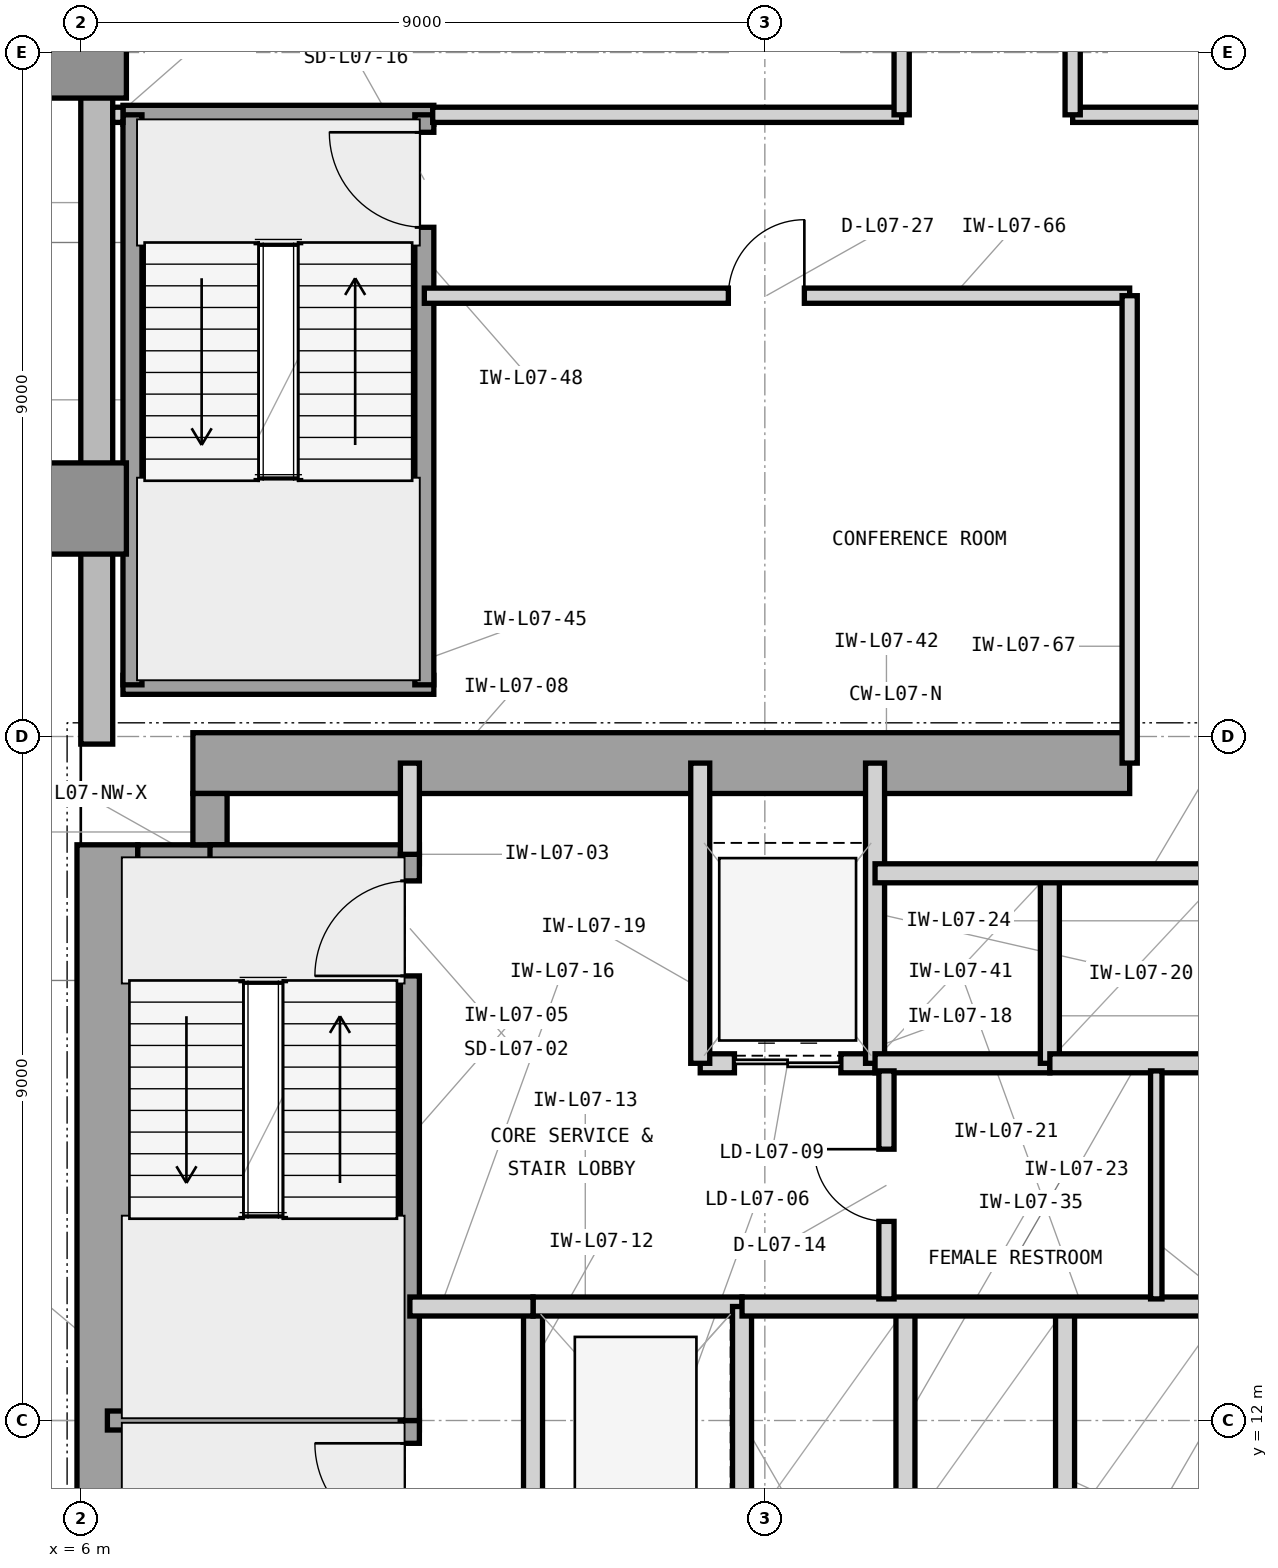
"""IFC4 building model, lengths in metres.
Left out: names, types, materials, properties, quantities, classifications, styles, units other than length and angle.
Written with IfcOpenShell. Run it as: python <this file> out.ifc"""

import sys

from ifc_helpers import new_model, si_unit, direction, frame, frame_2d, origin, origin_2d, place, context, subcontext, project, spatial, rectangle, extrude, element, fill, save


model = new_model("IFC4")
c1 = context("Model", 3, precision=1e-05, world=origin(), true_north=direction((0.0, 1.0)))
c2 = subcontext(c1, "Body", "Model", "MODEL_VIEW")
j1 = project(units=[si_unit("LENGTHUNIT", "METRE"), si_unit("PLANEANGLEUNIT", "RADIAN")], contexts=[c1])
p1 = place(None, origin())
s1 = spatial("IfcSite", under=j1, at=p1, CompositionType="ELEMENT")
p2 = place(p1, origin())
s2 = spatial("IfcBuilding", under=s1, at=p2, CompositionType="ELEMENT")
p3 = place(p2, frame((0.0, 0.0, 34.2)))
s3 = spatial("IfcBuildingStorey", under=s2, at=p3, CompositionType="ELEMENT", Elevation=34.2)
p4 = place(p3, frame((6.35, 4.425, 0.0), z_axis=(0.0, 0.0, 1.0), x_axis=(0.0, 1.0, 0.0)))
e1 = element("IfcWall", 1, at=p4, inside=s3, PredefinedType="SHEAR", context=c2, shape_type="SweptSolid", body=[
    extrude(rectangle(XDim=15.15, YDim=0.8, at=frame_2d((7.575, 0.0))), origin(), (0.0, 0.0, 1.0), 4.2),
])
p5 = place(p3, frame((7.475, 20.65, 0.0), z_axis=(0.0, 0.0, 1.0), x_axis=(1.0, 0.0, 0.0)))
e2 = element("IfcWall", 2, at=p5, inside=s3, PredefinedType="SHEAR", context=c2, shape_type="SweptSolid", body=[
    extrude(rectangle(XDim=12.325, YDim=0.8, at=frame_2d((6.163, 0.0))), origin(), (0.0, 0.0, 1.0), 4.2),
])
p6 = place(p3, frame((6.75, 19.35, 0.0), z_axis=(0.0, 0.0, 1.0), x_axis=(1.0, 0.0, 0.0)))
e3 = element("IfcWall", 3, at=p6, inside=s3, PredefinedType="SHEAR", context=c2, shape_type="SweptSolid", body=[
    extrude(rectangle(XDim=1.175, YDim=0.45, at=frame_2d((0.587, 0.0))), origin(), (0.0, 0.0, 1.0), 4.2),
])
p7 = place(p3, frame((7.7, 19.575, 0.0), z_axis=(0.0, 0.0, 1.0), x_axis=(0.0, 1.0, 0.0)))
e4 = element("IfcWall", 4, at=p7, inside=s3, PredefinedType="SHEAR", context=c2, shape_type="SweptSolid", body=[
    extrude(rectangle(XDim=0.675, YDim=0.45, at=frame_2d((0.337, 0.0))), origin(), (0.0, 0.0, 1.0), 4.2),
])
for number, where, z_axis, x_axis in (
    (5, (6.0, 24.0, 0.0), (0.0, 0.0, 1.0), (1.0, 0.0, 0.0)),
    (6, (6.0, 30.0, 0.0), (0.0, 0.0, 1.0), (1.0, 0.0, 0.0)),
):
    element("IfcColumn", number, at=place(p3, frame(where, z_axis=z_axis, x_axis=x_axis)), inside=s3, PredefinedType="COLUMN", context=c2, shape_type="SweptSolid", body=[
        extrude(rectangle(XDim=1.2, YDim=1.2, at=origin_2d()), origin(), (0.0, 0.0, 1.0), 4.2),
    ])
p8 = place(p3, frame((6.21, 49.4, 0.0), z_axis=(0.0, 0.0, 1.0), x_axis=(0.0, -1.0, 0.0)))
e7 = element("IfcWall", 7, at=p8, inside=s3, PredefinedType="STANDARD", context=c2, shape_type="SweptSolid", body=[
    extrude(rectangle(XDim=28.5, YDim=0.42, at=frame_2d((14.25, 0.0))), origin(), (0.0, 0.0, 1.0), 3.98),
])
p9 = place(p8, frame((15.225, 0.0, 0.85)))
e8 = element("IfcOpeningElement", 8, at=p9, cuts=e7, PredefinedType="OPENING", context=c2, shape_type="SweptSolid", body=[
    extrude(rectangle(XDim=2.8, YDim=2.45, at=frame_2d((1.4, 1.225))), frame((0.0, 0.22, 0.0), z_axis=(0.0, -1.0, 0.0), x_axis=(1.0, 0.0, 0.0)), (0.0, 0.0, 1.0), 0.44),
])
p10 = place(p8, frame((5.236, 0.0, 0.85)))
e9 = element("IfcOpeningElement", 9, at=p10, cuts=e7, PredefinedType="OPENING", context=c2, shape_type="SweptSolid", body=[
    extrude(rectangle(XDim=1.2, YDim=2.45, at=frame_2d((0.6, 1.225))), frame((0.0, 0.22, 0.0), z_axis=(0.0, -1.0, 0.0), x_axis=(1.0, 0.0, 0.0)), (0.0, 0.0, 1.0), 0.44),
])
p11 = place(p3, frame((6.35, 12.0, 0.0), z_axis=(0.0, 0.0, 1.0), x_axis=(1.0, 0.0, 0.0)))
e10 = element("IfcWall", 10, at=p11, inside=s3, PredefinedType="SHEAR", context=c2, shape_type="SweptSolid", body=[
    extrude(rectangle(XDim=4.105, YDim=0.25, at=frame_2d((2.052, 0.0))), origin(), (0.0, 0.0, 1.0), 4.2),
])
p12 = place(p3, frame((7.7, 19.45, 0.0), z_axis=(0.0, 0.0, 1.0), x_axis=(1.0, 0.0, 0.0)))
e11 = element("IfcWall", 11, at=p12, inside=s3, PredefinedType="SHEAR", context=c2, shape_type="SweptSolid", body=[
    extrude(rectangle(XDim=2.755, YDim=0.25, at=frame_2d((1.377, 0.0))), origin(), (0.0, 0.0, 1.0), 4.2),
])
p13 = place(p3, frame((10.33, 4.55, 0.0), z_axis=(0.0, 0.0, 1.0), x_axis=(0.0, 1.0, 0.0)))
e12 = element("IfcWall", 12, at=p13, inside=s3, PredefinedType="SHEAR", context=c2, shape_type="SweptSolid", body=[
    extrude(rectangle(XDim=7.45, YDim=0.25, at=frame_2d((3.725, 0.0))), origin(), (0.0, 0.0, 1.0), 4.2),
])
p14 = place(p13, frame((5.9, 0.0, 0.0)))
e13 = element("IfcOpeningElement", 13, at=p14, cuts=e12, PredefinedType="OPENING", context=c2, shape_type="SweptSolid", body=[
    extrude(rectangle(XDim=1.25, YDim=2.2, at=frame_2d((0.625, 1.1))), frame((0.0, 0.135, 0.0), z_axis=(0.0, -1.0, 0.0), x_axis=(1.0, 0.0, 0.0)), (0.0, 0.0, 1.0), 0.27),
])
p15 = place(p3, frame((10.33, 12.0, 0.0), z_axis=(0.0, 0.0, 1.0), x_axis=(0.0, 1.0, 0.0)))
e14 = element("IfcWall", 14, at=p15, inside=s3, PredefinedType="SHEAR", context=c2, shape_type="SweptSolid", body=[
    extrude(rectangle(XDim=7.45, YDim=0.25, at=frame_2d((3.725, 0.0))), origin(), (0.0, 0.0, 1.0), 4.2),
])
p16 = place(p15, frame((5.85, 0.0, 0.0)))
e15 = element("IfcOpeningElement", 15, at=p16, cuts=e14, PredefinedType="OPENING", context=c2, shape_type="SweptSolid", body=[
    extrude(rectangle(XDim=1.25, YDim=2.2, at=frame_2d((0.625, 1.1))), frame((0.0, 0.135, 0.0), z_axis=(0.0, -1.0, 0.0), x_axis=(1.0, 0.0, 0.0)), (0.0, 0.0, 1.0), 0.27),
])
p17 = place(p3, frame((10.33, 19.45, 0.0), z_axis=(0.0, 0.0, 1.0), x_axis=(0.0, 1.0, 0.0)))
e16 = element("IfcWall", 16, at=p17, inside=s3, PredefinedType="PARTITIONING", context=c2, shape_type="SweptSolid", body=[
    extrude(rectangle(XDim=1.2, YDim=0.25, at=frame_2d((0.6, 0.0))), origin(), (0.0, 0.0, 1.0), 3.114),
])
p18 = place(p3, frame((11.95, 10.5, 0.0), z_axis=(0.0, 0.0, 1.0), x_axis=(0.0, 1.0, 0.0)))
e17 = element("IfcWall", 17, at=p18, inside=s3, PredefinedType="PARTITIONING", context=c2, shape_type="SweptSolid", body=[
    extrude(rectangle(XDim=3.0, YDim=0.25, at=frame_2d((1.5, 0.0))), origin(), (0.0, 0.0, 1.0), 3.97),
])
p19 = place(p3, frame((11.95, 13.5, 0.0), z_axis=(0.0, 0.0, 1.0), x_axis=(1.0, 0.0, 0.0)))
e18 = element("IfcWall", 18, at=p19, inside=s3, PredefinedType="PARTITIONING", context=c2, shape_type="SweptSolid", body=[
    extrude(rectangle(XDim=2.75, YDim=0.25, at=frame_2d((1.375, 0.0))), origin(), (0.0, 0.0, 1.0), 3.426),
])
p20 = place(p3, frame((14.7, 10.5, 0.0), z_axis=(0.0, 0.0, 1.0), x_axis=(0.0, 1.0, 0.0)))
e19 = element("IfcWall", 19, at=p20, inside=s3, PredefinedType="PARTITIONING", context=c2, shape_type="SweptSolid", body=[
    extrude(rectangle(XDim=3.0, YDim=0.25, at=frame_2d((1.5, 0.0))), origin(), (0.0, 0.0, 1.0), 3.97),
])
p21 = place(p3, frame((10.33, 13.5, 0.0), z_axis=(0.0, 0.0, 1.0), x_axis=(1.0, 0.0, 0.0)))
e20 = element("IfcWall", 20, at=p21, inside=s3, PredefinedType="PARTITIONING", context=c2, shape_type="SweptSolid", body=[
    extrude(rectangle(XDim=1.62, YDim=0.25, at=frame_2d((0.81, 0.0))), origin(), (0.0, 0.0, 1.0), 3.426),
])
p22 = place(p3, frame((14.15, 16.7, 0.0), z_axis=(0.0, 0.0, 1.0), x_axis=(1.0, 0.0, 0.0)))
e21 = element("IfcWall", 21, at=p22, inside=s3, PredefinedType="PARTITIONING", context=c2, shape_type="SweptSolid", body=[
    extrude(rectangle(XDim=2.3, YDim=0.25, at=frame_2d((1.15, 0.0))), origin(), (0.0, 0.0, 1.0), 3.426),
])
p23 = place(p22, frame((0.45, 0.0, 0.0)))
e22 = element("IfcOpeningElement", 22, at=p23, cuts=e21, PredefinedType="OPENING", context=c2, shape_type="SweptSolid", body=[
    extrude(rectangle(XDim=1.4, YDim=2.35, at=frame_2d((0.7, 1.175))), frame((0.0, 0.135, 0.0), z_axis=(0.0, -1.0, 0.0), x_axis=(1.0, 0.0, 0.0)), (0.0, 0.0, 1.0), 0.27),
])
for number, where, z_axis, x_axis in (
    (23, (14.15, 16.7, 0.0), (0.0, 0.0, 1.0), (0.0, 1.0, 0.0)),
    (24, (16.45, 16.7, 0.0), (0.0, 0.0, 1.0), (0.0, 1.0, 0.0)),
):
    element("IfcWall", number, at=place(p3, frame(where, z_axis=z_axis, x_axis=x_axis)), inside=s3, PredefinedType="PARTITIONING", context=c2, shape_type="SweptSolid", body=[
        extrude(rectangle(XDim=3.95, YDim=0.25, at=frame_2d((1.975, 0.0))), origin(), (0.0, 0.0, 1.0), 3.97),
    ])
p24 = place(p3, frame((16.45, 16.7, 0.0), z_axis=(0.0, 0.0, 1.0), x_axis=(1.0, 0.0, 0.0)))
e25 = element("IfcWall", 25, at=p24, inside=s3, PredefinedType="PARTITIONING", context=c2, shape_type="SweptSolid", body=[
    extrude(rectangle(XDim=2.3, YDim=0.25, at=frame_2d((1.15, 0.0))), origin(), (0.0, 0.0, 1.0), 3.426),
])
p25 = place(p3, frame((18.75, 16.7, 0.0), z_axis=(0.0, 0.0, 1.0), x_axis=(0.0, 1.0, 0.0)))
e26 = element("IfcWall", 26, at=p25, inside=s3, PredefinedType="PARTITIONING", context=c2, shape_type="SweptSolid", body=[
    extrude(rectangle(XDim=2.5, YDim=0.25, at=frame_2d((1.25, 0.0))), origin(), (0.0, 0.0, 1.0), 3.97),
])
p26 = place(p3, frame((18.75, 16.7, 0.0), z_axis=(0.0, 0.0, 1.0), x_axis=(1.0, 0.0, 0.0)))
e27 = element("IfcWall", 27, at=p26, inside=s3, PredefinedType="PARTITIONING", context=c2, shape_type="SweptSolid", body=[
    extrude(rectangle(XDim=2.3, YDim=0.25, at=frame_2d((1.15, 0.0))), origin(), (0.0, 0.0, 1.0), 3.426),
])
p27 = place(p3, frame((16.45, 19.2, 0.0), z_axis=(0.0, 0.0, 1.0), x_axis=(1.0, 0.0, 0.0)))
e28 = element("IfcWall", 28, at=p27, inside=s3, PredefinedType="PARTITIONING", context=c2, shape_type="SweptSolid", body=[
    extrude(rectangle(XDim=7.2, YDim=0.25, at=frame_2d((3.6, 0.0))), origin(), (0.0, 0.0, 1.0), 3.97),
])
for number, where, z_axis, x_axis in (
    (29, (16.85, 10.5, 0.0), (0.0, 0.0, 1.0), (0.0, 1.0, 0.0)),
    (30, (18.95, 10.5, 0.0), (0.0, 0.0, 1.0), (0.0, 1.0, 0.0)),
):
    element("IfcWall", number, at=place(p3, frame(where, z_axis=z_axis, x_axis=x_axis)), inside=s3, PredefinedType="PARTITIONING", context=c2, shape_type="SweptSolid", body=[
        extrude(rectangle(XDim=3.0, YDim=0.25, at=frame_2d((1.5, 0.0))), origin(), (0.0, 0.0, 1.0), 3.97),
    ])
p28 = place(p3, frame((14.7, 13.5, 0.0), z_axis=(0.0, 0.0, 1.0), x_axis=(1.0, 0.0, 0.0)))
e31 = element("IfcWall", 31, at=p28, inside=s3, PredefinedType="PARTITIONING", context=c2, shape_type="SweptSolid", body=[
    extrude(rectangle(XDim=8.95, YDim=0.25, at=frame_2d((4.475, 0.0))), origin(), (0.0, 0.0, 1.0), 3.426),
])
p29 = place(p3, frame((16.6, 13.6, 0.0), z_axis=(0.0, 0.0, 1.0), x_axis=(0.0, 1.0, 0.0)))
e32 = element("IfcWall", 32, at=p29, inside=s3, PredefinedType="PARTITIONING", context=c2, shape_type="SweptSolid", body=[
    extrude(rectangle(XDim=3.0, YDim=0.2, at=frame_2d((1.5, 0.0))), origin(), (0.0, 0.0, 1.0), 3.97),
])
p30 = place(p29, frame((1.02, 0.0, 0.0)))
e33 = element("IfcOpeningElement", 33, at=p30, cuts=e32, PredefinedType="OPENING", context=c2, shape_type="SweptSolid", body=[
    extrude(rectangle(XDim=0.95, YDim=2.1, at=frame_2d((0.475, 1.05))), frame((0.0, 0.11, 0.0), z_axis=(0.0, -1.0, 0.0), x_axis=(1.0, 0.0, 0.0)), (0.0, 0.0, 1.0), 0.22),
])
p31 = place(p3, frame((20.15, 13.6, 0.0), z_axis=(0.0, 0.0, 1.0), x_axis=(0.0, 1.0, 0.0)))
e34 = element("IfcWall", 34, at=p31, inside=s3, PredefinedType="PARTITIONING", context=c2, shape_type="SweptSolid", body=[
    extrude(rectangle(XDim=3.0, YDim=0.15, at=frame_2d((1.5, 0.0))), origin(), (0.0, 0.0, 1.0), 3.97),
])
for number, where, z_axis, x_axis in (
    (35, (6.555, 21.68, 0.0), (0.0, 0.0, 1.0), (1.0, 0.0, 0.0)),
    (36, (6.555, 29.18, 0.0), (0.0, 0.0, 1.0), (1.0, 0.0, 0.0)),
):
    element("IfcWall", number, at=place(p3, frame(where, z_axis=z_axis, x_axis=x_axis)), inside=s3, PredefinedType="SHEAR", context=c2, shape_type="SweptSolid", body=[
        extrude(rectangle(XDim=4.09, YDim=0.25, at=frame_2d((2.045, 0.0))), origin(), (0.0, 0.0, 1.0), 4.2),
    ])
p32 = place(p3, frame((6.68, 21.68, 0.0), z_axis=(0.0, 0.0, 1.0), x_axis=(0.0, 1.0, 0.0)))
e37 = element("IfcWall", 37, at=p32, inside=s3, PredefinedType="SHEAR", context=c2, shape_type="SweptSolid", body=[
    extrude(rectangle(XDim=7.5, YDim=0.25, at=frame_2d((3.75, 0.0))), origin(), (0.0, 0.0, 1.0), 4.2),
])
p33 = place(p3, frame((10.52, 21.68, 0.0), z_axis=(0.0, 0.0, 1.0), x_axis=(0.0, 1.0, 0.0)))
e38 = element("IfcWall", 38, at=p33, inside=s3, PredefinedType="SHEAR", context=c2, shape_type="SweptSolid", body=[
    extrude(rectangle(XDim=7.5, YDim=0.25, at=frame_2d((3.75, 0.0))), origin(), (0.0, 0.0, 1.0), 4.2),
])
p34 = place(p33, frame((6.02, 0.0, 0.0)))
e39 = element("IfcOpeningElement", 39, at=p34, cuts=e38, PredefinedType="OPENING", context=c2, shape_type="SweptSolid", body=[
    extrude(rectangle(XDim=1.25, YDim=2.2, at=frame_2d((0.625, 1.1))), frame((0.0, 0.135, 0.0), z_axis=(0.0, -1.0, 0.0), x_axis=(1.0, 0.0, 0.0)), (0.0, 0.0, 1.0), 0.27),
])
p35 = place(p3, frame((10.52, 26.8, 0.0), z_axis=(0.0, 0.0, 1.0), x_axis=(1.0, 0.0, 0.0)))
e40 = element("IfcWall", 40, at=p35, inside=s3, PredefinedType="PARTITIONING", context=c2, shape_type="SweptSolid", body=[
    extrude(rectangle(XDim=9.28, YDim=0.2, at=frame_2d((4.64, 0.0))), origin(), (0.0, 0.0, 1.0), 3.97),
])
p36 = place(p35, frame((4.0, 0.0, 0.0)))
e41 = element("IfcOpeningElement", 41, at=p36, cuts=e40, PredefinedType="OPENING", context=c2, shape_type="SweptSolid", body=[
    extrude(rectangle(XDim=1.0, YDim=2.15, at=frame_2d((0.5, 1.075))), frame((0.0, 0.11, 0.0), z_axis=(0.0, -1.0, 0.0), x_axis=(1.0, 0.0, 0.0)), (0.0, 0.0, 1.0), 0.22),
])
p37 = place(p3, frame((19.8, 20.65, 0.0), z_axis=(0.0, 0.0, 1.0), x_axis=(0.0, 1.0, 0.0)))
e42 = element("IfcWall", 42, at=p37, inside=s3, PredefinedType="PARTITIONING", context=c2, shape_type="SweptSolid", body=[
    extrude(rectangle(XDim=6.15, YDim=0.2, at=frame_2d((3.075, 0.0))), origin(), (0.0, 0.0, 1.0), 3.97),
])
p38 = place(p3, frame((6.42, 29.18, 0.0), z_axis=(0.0, 0.0, 1.0), x_axis=(1.0, 0.0, 0.0)))
e43 = element("IfcWall", 43, at=p38, inside=s3, PredefinedType="PARTITIONING", context=c2, shape_type="SweptSolid", body=[
    extrude(rectangle(XDim=0.135, YDim=0.2, at=frame_2d((0.067, 0.0))), origin(), (0.0, 0.0, 1.0), 3.97),
])
p39 = place(p3, frame((10.63, 29.18, 0.0), z_axis=(0.0, 0.0, 1.0), x_axis=(1.0, 0.0, 0.0)))
e44 = element("IfcWall", 44, at=p39, inside=s3, PredefinedType="PARTITIONING", context=c2, shape_type="SweptSolid", body=[
    extrude(rectangle(XDim=6.17, YDim=0.2, at=frame_2d((3.085, 0.0))), origin(), (0.0, 0.0, 1.0), 3.97),
])
p40 = place(p3, frame((19.05, 29.18, 0.0), z_axis=(0.0, 0.0, 1.0), x_axis=(1.0, 0.0, 0.0)))
e45 = element("IfcWall", 45, at=p40, inside=s3, PredefinedType="PARTITIONING", context=c2, shape_type="SweptSolid", body=[
    extrude(rectangle(XDim=4.77, YDim=0.2, at=frame_2d((2.385, 0.0))), origin(), (0.0, 0.0, 1.0), 3.97),
])
p41 = place(p3, frame((16.8, 29.18, 0.0), z_axis=(0.0, 0.0, 1.0), x_axis=(0.0, 1.0, 0.0)))
e46 = element("IfcWall", 46, at=p41, inside=s3, PredefinedType="PARTITIONING", context=c2, shape_type="SweptSolid", body=[
    extrude(rectangle(XDim=6.0, YDim=0.2, at=frame_2d((3.0, 0.0))), origin(), (0.0, 0.0, 1.0), 3.97),
])
p42 = place(p41, frame((2.5, 0.0, 0.0)))
e47 = element("IfcOpeningElement", 47, at=p42, cuts=e46, PredefinedType="OPENING", context=c2, shape_type="SweptSolid", body=[
    extrude(rectangle(XDim=1.0, YDim=2.15, at=frame_2d((0.5, 1.075))), frame((0.0, 0.11, 0.0), z_axis=(0.0, -1.0, 0.0), x_axis=(1.0, 0.0, 0.0)), (0.0, 0.0, 1.0), 0.22),
])
p43 = place(p3, frame((19.05, 29.18, 0.0), z_axis=(0.0, 0.0, 1.0), x_axis=(0.0, 1.0, 0.0)))
e48 = element("IfcWall", 48, at=p43, inside=s3, PredefinedType="PARTITIONING", context=c2, shape_type="SweptSolid", body=[
    extrude(rectangle(XDim=10.5, YDim=0.2, at=frame_2d((5.25, 0.0))), origin(), (0.0, 0.0, 1.0), 3.97),
])
p44 = place(p43, frame((4.5, 0.0, 0.0)))
e49 = element("IfcOpeningElement", 49, at=p44, cuts=e48, PredefinedType="OPENING", context=c2, shape_type="SweptSolid", body=[
    extrude(rectangle(XDim=1.5, YDim=2.3, at=frame_2d((0.75, 1.15))), frame((0.0, 0.11, 0.0), z_axis=(0.0, -1.0, 0.0), x_axis=(1.0, 0.0, 0.0)), (0.0, 0.0, 1.0), 0.22),
])
p45 = place(p14, origin())
e50 = element("IfcDoor", 50, at=p45, inside=s3, OperationType="SINGLE_SWING_RIGHT", PredefinedType="DOOR", context=c2, shape_type="SweptSolid", body=[
    extrude(rectangle(XDim=1.25, YDim=2.2, at=frame_2d((0.625, 1.1))), frame((0.0, 0.025, 0.0), z_axis=(0.0, -1.0, 0.0), x_axis=(1.0, 0.0, 0.0)), (0.0, 0.0, 1.0), 0.05),
])
fill(e13, e50)
p46 = place(p16, origin())
e51 = element("IfcDoor", 51, at=p46, inside=s3, OperationType="SINGLE_SWING_LEFT", PredefinedType="DOOR", context=c2, shape_type="SweptSolid", body=[
    extrude(rectangle(XDim=1.25, YDim=2.2, at=frame_2d((0.625, 1.1))), frame((0.0, 0.025, 0.0), z_axis=(0.0, -1.0, 0.0), x_axis=(1.0, 0.0, 0.0)), (0.0, 0.0, 1.0), 0.05),
])
fill(e15, e51)
p47 = place(p23, origin())
e52 = element("IfcDoor", 52, at=p47, inside=s3, OperationType="DOUBLE_DOOR_SLIDING", PredefinedType="DOOR", context=c2, shape_type="SweptSolid", body=[
    extrude(rectangle(XDim=1.4, YDim=2.35, at=frame_2d((0.7, 1.175))), frame((0.0, 0.025, 0.0), z_axis=(0.0, -1.0, 0.0), x_axis=(1.0, 0.0, 0.0)), (0.0, 0.0, 1.0), 0.05),
])
fill(e22, e52)
p48 = place(p30, origin())
e53 = element("IfcDoor", 53, at=p48, inside=s3, OperationType="SINGLE_SWING_RIGHT", PredefinedType="DOOR", context=c2, shape_type="SweptSolid", body=[
    extrude(rectangle(XDim=0.95, YDim=2.1, at=frame_2d((0.475, 1.05))), frame((0.0, 0.025, 0.0), z_axis=(0.0, -1.0, 0.0), x_axis=(1.0, 0.0, 0.0)), (0.0, 0.0, 1.0), 0.05),
])
fill(e33, e53)
p49 = place(p34, origin())
e54 = element("IfcDoor", 54, at=p49, inside=s3, OperationType="SINGLE_SWING_RIGHT", PredefinedType="DOOR", context=c2, shape_type="SweptSolid", body=[
    extrude(rectangle(XDim=1.25, YDim=2.2, at=frame_2d((0.625, 1.1))), frame((0.0, 0.025, 0.0), z_axis=(0.0, -1.0, 0.0), x_axis=(1.0, 0.0, 0.0)), (0.0, 0.0, 1.0), 0.05),
])
fill(e39, e54)
p50 = place(p36, origin())
e55 = element("IfcDoor", 55, at=p50, inside=s3, OperationType="SINGLE_SWING_RIGHT", PredefinedType="DOOR", context=c2, shape_type="SweptSolid", body=[
    extrude(rectangle(XDim=1.0, YDim=2.15, at=frame_2d((0.5, 1.075))), frame((0.0, 0.025, 0.0), z_axis=(0.0, -1.0, 0.0), x_axis=(1.0, 0.0, 0.0)), (0.0, 0.0, 1.0), 0.05),
])
fill(e41, e55)
save(model, sys.argv[1])
